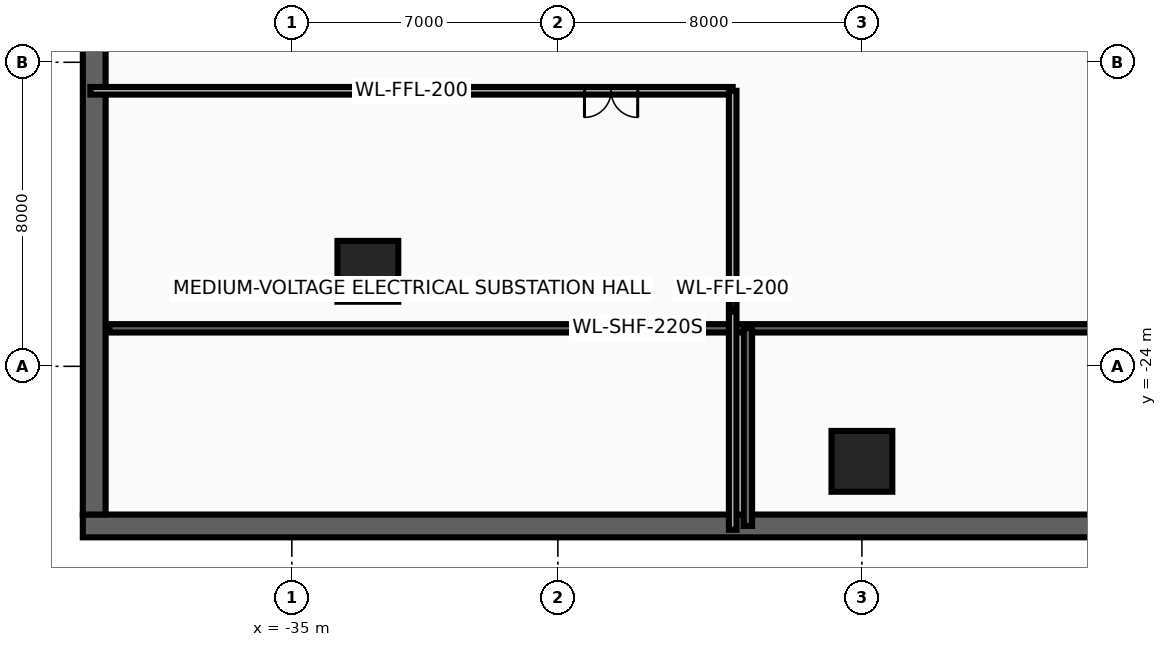
"""IFC4 building model, lengths in metres.
Left out: names, types, materials, properties, quantities, classifications, styles, units other than length and angle.
Written with IfcOpenShell. Run it as: python <this file> out.ifc"""

import sys

from ifc_helpers import new_model, si_unit, direction, frame, frame_2d, origin, origin_2d, place, context, subcontext, project, spatial, rectangle, extrude, source, transform, mapped, element, fill, save


model = new_model("IFC4")
c1 = context("Model", 3, precision=1e-05, world=origin(), true_north=direction((0.0, 1.0)))
c2 = subcontext(c1, "Body", "Model", "MODEL_VIEW")
j1 = project(units=[si_unit("LENGTHUNIT", "METRE"), si_unit("PLANEANGLEUNIT", "RADIAN")], contexts=[c1])
p1 = place(None, origin())
s1 = spatial("IfcSite", under=j1, at=p1, CompositionType="ELEMENT")
p2 = place(p1, origin())
s2 = spatial("IfcBuilding", under=s1, at=p2, CompositionType="ELEMENT")
p3 = place(p2, frame((0.0, 0.0, -4.8)))
s3 = spatial("IfcBuildingStorey", under=s2, at=p3, CompositionType="ELEMENT", Elevation=-4.8)
p4 = place(p3, frame((-40.5, -28.2, 0.0), z_axis=(0.0, 0.0, 1.0), x_axis=(1.0, 0.0, 0.0)))
e1 = element("IfcWall", 1, at=p4, inside=s3, PredefinedType="SOLIDWALL", context=c2, shape_type="SweptSolid", body=[
    extrude(rectangle(XDim=81.0, YDim=0.6, at=frame_2d((40.5, 0.0))), origin(), (0.0, 0.0, 1.0), 4.52),
])
p5 = place(p3, frame((-40.2, -27.9, 0.0), z_axis=(0.0, 0.0, 1.0), x_axis=(0.0, 1.0, 0.0)))
e2 = element("IfcWall", 2, at=p5, inside=s3, PredefinedType="SOLIDWALL", context=c2, shape_type="SweptSolid", body=[
    extrude(rectangle(XDim=55.8, YDim=0.6, at=frame_2d((27.9, 0.0))), origin(), (0.0, 0.0, 1.0), 4.52),
])
p6 = place(p3, frame((-39.8, -23.0, 0.0), z_axis=(0.0, 0.0, 1.0), x_axis=(1.0, 0.0, 0.0)))
e3 = element("IfcWall", 3, at=p6, inside=s3, PredefinedType="SHEAR", context=c2, shape_type="SweptSolid", body=[
    extrude(rectangle(XDim=27.8, YDim=0.22, at=frame_2d((13.9, 0.0))), origin(), (0.0, 0.0, 1.0), 4.52),
])
p7 = place(p3, frame((-23.0, -28.2, 0.0), z_axis=(0.0, 0.0, 1.0), x_axis=(0.0, 1.0, 0.0)))
e4 = element("IfcWall", 4, at=p7, inside=s3, PredefinedType="SHEAR", context=c2, shape_type="SweptSolid", body=[
    extrude(rectangle(XDim=5.2, YDim=0.22, at=frame_2d((2.6, 0.0))), origin(), (0.0, 0.0, 1.0), 4.52),
])
m1 = source(origin(), c2, "Body", "SweptSolid", [
    extrude(rectangle(XDim=1.6, YDim=1.6, at=origin_2d()), origin(), (0.0, 0.0, 1.0), 4.8),
])
for number, where, z_axis, x_axis in (
    (5, (-33.0, -21.5, 0.0), (0.0, 0.0, 1.0), (1.0, 0.0, 0.0)),
    (6, (-20.0, -26.5, 0.0), (0.0, 0.0, 1.0), (1.0, 0.0, 0.0)),
):
    element("IfcColumn", number, at=place(p3, frame(where, z_axis=z_axis, x_axis=x_axis)), inside=s3, PredefinedType="COLUMN", context=c2, shape_type="MappedRepresentation", body=[
        mapped(m1, transform((0.0, 0.0, 0.0), x_axis=(1.0, 0.0, 0.0), y_axis=(0.0, 1.0, 0.0), z_axis=(0.0, 0.0, 1.0), scale=1.0)),
    ])
p8 = place(p3, frame((-40.3, -16.75, 0.0), z_axis=(0.0, 0.0, 1.0), x_axis=(1.0, 0.0, 0.0)))
e7 = element("IfcWall", 7, at=p8, inside=s3, PredefinedType="PARTITIONING", context=c2, shape_type="SweptSolid", body=[
    extrude(rectangle(XDim=16.9, YDim=0.2, at=frame_2d((8.45, 0.0))), origin(), (0.0, 0.0, 1.0), 3.956),
])
p9 = place(p8, frame((13.0, 0.0, 0.0)))
e8 = element("IfcOpeningElement", 8, at=p9, cuts=e7, PredefinedType="OPENING", context=c2, shape_type="SweptSolid", body=[
    extrude(rectangle(XDim=1.4, YDim=2.15, at=frame_2d((0.7, 1.075))), frame((0.0, 0.115, 0.0), z_axis=(0.0, -1.0, 0.0), x_axis=(1.0, 0.0, 0.0)), (0.0, 0.0, 1.0), 0.23),
])
p10 = place(p3, frame((-23.4, -28.3, 0.0), z_axis=(0.0, 0.0, 1.0), x_axis=(0.0, 1.0, 0.0)))
e9 = element("IfcWall", 9, at=p10, inside=s3, PredefinedType="PARTITIONING", context=c2, shape_type="SweptSolid", body=[
    extrude(rectangle(XDim=11.55, YDim=0.2, at=frame_2d((5.775, 0.0))), origin(), (0.0, 0.0, 1.0), 4.52),
])
p11 = place(p9, frame((1.4, 0.0, 0.0), z_axis=(0.0, 0.0, 1.0), x_axis=(-1.0, 0.0, 0.0)))
e10 = element("IfcDoor", 10, at=p11, inside=s3, OperationType="DOUBLE_DOOR_SINGLE_SWING", PredefinedType="DOOR", context=c2, shape_type="SweptSolid", body=[
    extrude(rectangle(XDim=1.4, YDim=2.15, at=frame_2d((0.7, 1.075))), frame((0.0, 0.025, 0.0), z_axis=(0.0, -1.0, 0.0), x_axis=(1.0, 0.0, 0.0)), (0.0, 0.0, 1.0), 0.05),
])
fill(e8, e10)
save(model, sys.argv[1])
